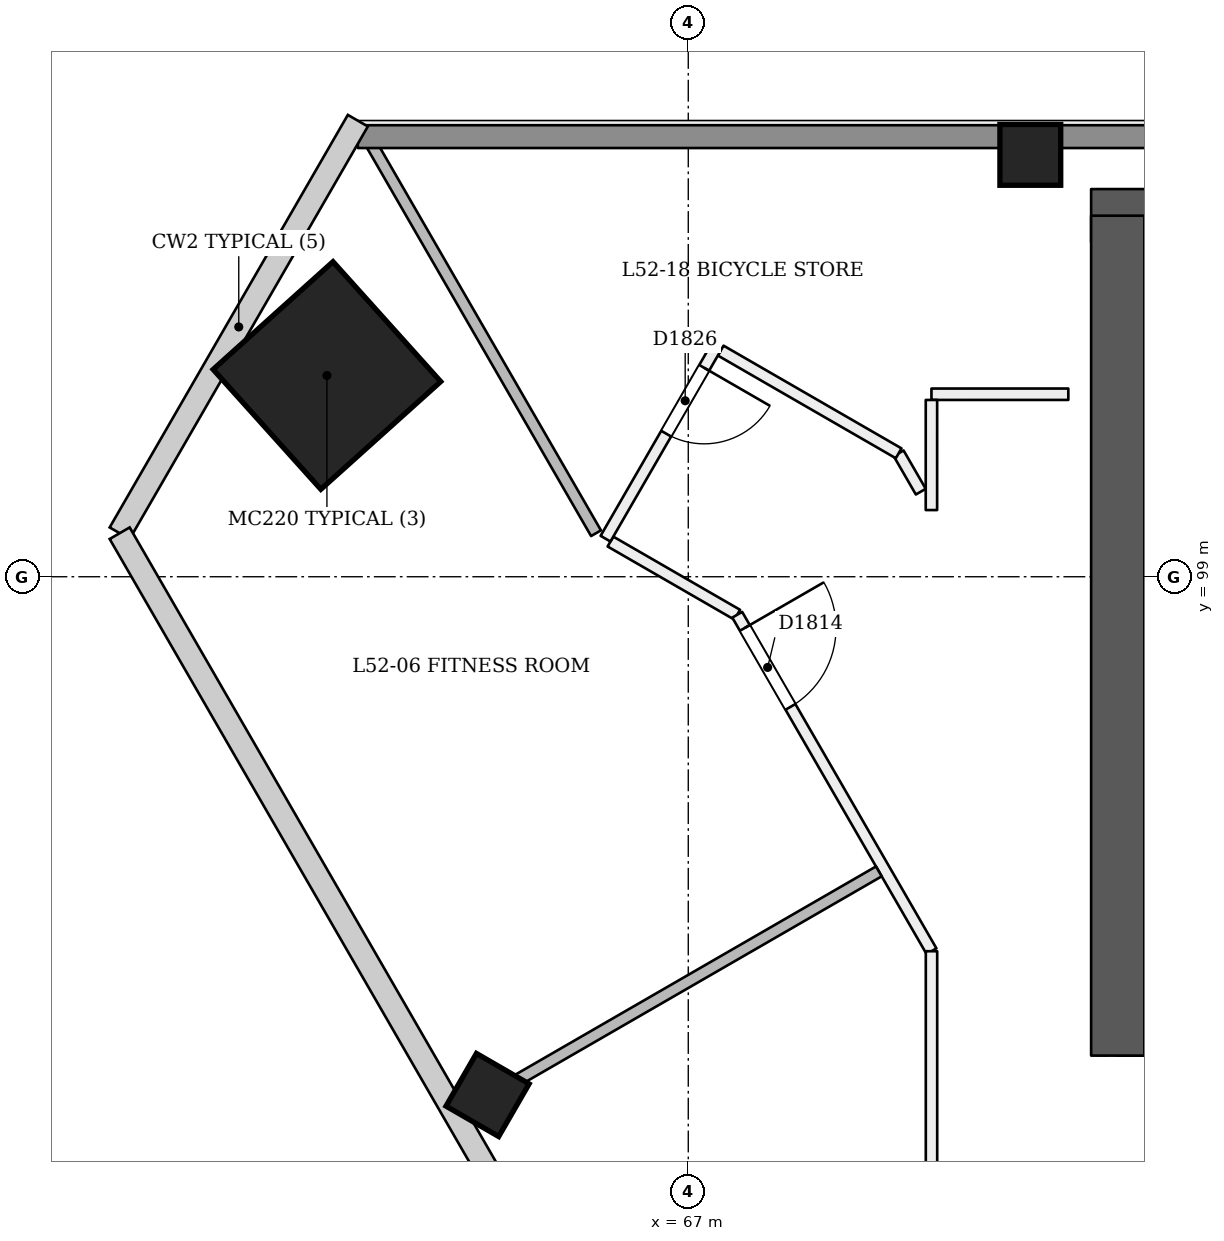
"""IFC4 building model, lengths in metres.
Left out: names, types, materials, properties, quantities, classifications, styles, units other than length and angle.
Written with IfcOpenShell. Run it as: python <this file> out.ifc"""

import sys

from ifc_helpers import new_model, si_unit, direction, frame, frame_2d, origin, origin_2d, place, context, subcontext, project, spatial, rectangle, extrude, element, fill, save


model = new_model("IFC4")
c1 = context("Model", 3, precision=1e-05, world=origin(), true_north=direction((0.0, 1.0)))
c2 = subcontext(c1, "Body", "Model", "MODEL_VIEW")
j1 = project(units=[si_unit("LENGTHUNIT", "METRE"), si_unit("PLANEANGLEUNIT", "RADIAN")], contexts=[c1])
p1 = place(None, origin())
s1 = spatial("IfcSite", under=j1, at=p1, CompositionType="ELEMENT")
p2 = place(p1, origin())
s2 = spatial("IfcBuilding", under=s1, at=p2, CompositionType="ELEMENT")
p3 = place(p2, frame((0.0, 0.0, 201.6)))
s3 = spatial("IfcBuildingStorey", under=s2, at=p3, CompositionType="ELEMENT", Elevation=201.6)
p4 = place(p3, frame((72.65, 93.05, 0.0), z_axis=(0.0, 0.0, 1.0), x_axis=(1.0, 0.0, 0.0)))
e1 = element("IfcWall", 1, at=p4, inside=s3, PredefinedType="SHEAR", context=c2, shape_type="SweptSolid", body=[
    extrude(rectangle(XDim=25.05, YDim=0.7, at=frame_2d((12.525, 0.0))), origin(), (0.0, 0.0, 1.0), 3.6),
])
p5 = place(p4, frame((1.15, 0.0, 0.0)))
e2 = element("IfcOpeningElement", 2, at=p5, cuts=e1, PredefinedType="OPENING", context=c2, shape_type="SweptSolid", body=[
    extrude(rectangle(XDim=1.2, YDim=2.1, at=frame_2d((0.6, 1.05))), frame((0.0, 0.36, 0.0), z_axis=(0.0, -1.0, 0.0), x_axis=(1.0, 0.0, 0.0)), (0.0, 0.0, 1.0), 0.721),
])
p6 = place(p4, frame((3.35, 0.0, 0.0)))
e3 = element("IfcOpeningElement", 3, at=p6, cuts=e1, PredefinedType="OPENING", context=c2, shape_type="SweptSolid", body=[
    extrude(rectangle(XDim=1.2, YDim=2.1, at=frame_2d((0.6, 1.05))), frame((0.0, 0.36, 0.0), z_axis=(0.0, -1.0, 0.0), x_axis=(1.0, 0.0, 0.0)), (0.0, 0.0, 1.0), 0.721),
])
p7 = place(p4, frame((13.35, 0.0, 0.0)))
e4 = element("IfcOpeningElement", 4, at=p7, cuts=e1, PredefinedType="OPENING", context=c2, shape_type="SweptSolid", body=[
    extrude(rectangle(XDim=1.2, YDim=2.1, at=frame_2d((0.6, 1.05))), frame((0.0, 0.36, 0.0), z_axis=(0.0, -1.0, 0.0), x_axis=(1.0, 0.0, 0.0)), (0.0, 0.0, 1.0), 0.721),
])
p8 = place(p4, frame((15.812, 0.0, 0.0)))
e5 = element("IfcOpeningElement", 5, at=p8, cuts=e1, PredefinedType="OPENING", context=c2, shape_type="SweptSolid", body=[
    extrude(rectangle(XDim=1.0, YDim=2.1, at=frame_2d((0.5, 1.05))), frame((0.0, 0.36, 0.0), z_axis=(0.0, -1.0, 0.0), x_axis=(1.0, 0.0, 0.0)), (0.0, 0.0, 1.0), 0.721),
])
p9 = place(p4, frame((18.25, 0.0, 0.0)))
e6 = element("IfcOpeningElement", 6, at=p9, cuts=e1, PredefinedType="OPENING", context=c2, shape_type="SweptSolid", body=[
    extrude(rectangle(XDim=1.0, YDim=2.1, at=frame_2d((0.5, 1.05))), frame((0.0, 0.36, 0.0), z_axis=(0.0, -1.0, 0.0), x_axis=(1.0, 0.0, 0.0)), (0.0, 0.0, 1.0), 0.721),
])
p10 = place(p4, frame((20.6, 0.0, 0.0)))
e7 = element("IfcOpeningElement", 7, at=p10, cuts=e1, PredefinedType="OPENING", context=c2, shape_type="SweptSolid", body=[
    extrude(rectangle(XDim=1.0, YDim=2.1, at=frame_2d((0.5, 1.05))), frame((0.0, 0.36, 0.0), z_axis=(0.0, -1.0, 0.0), x_axis=(1.0, 0.0, 0.0)), (0.0, 0.0, 1.0), 0.721),
])
p11 = place(p4, frame((22.887, 0.0, 0.0)))
e8 = element("IfcOpeningElement", 8, at=p11, cuts=e1, PredefinedType="OPENING", context=c2, shape_type="SweptSolid", body=[
    extrude(rectangle(XDim=1.0, YDim=2.1, at=frame_2d((0.5, 1.05))), frame((0.0, 0.36, 0.0), z_axis=(0.0, -1.0, 0.0), x_axis=(1.0, 0.0, 0.0)), (0.0, 0.0, 1.0), 0.721),
])
p12 = place(p3, frame((97.35, 103.75, 0.0), z_axis=(0.0, 0.0, 1.0), x_axis=(-1.0, 0.0, 0.0)))
e9 = element("IfcWall", 9, at=p12, inside=s3, PredefinedType="SHEAR", context=c2, shape_type="SweptSolid", body=[
    extrude(rectangle(XDim=25.05, YDim=0.7, at=frame_2d((12.525, 0.0))), origin(), (0.0, 0.0, 1.0), 3.6),
])
p13 = place(p3, frame((72.65, 103.75, 0.0), z_axis=(0.0, 0.0, 1.0), x_axis=(0.0, -1.0, 0.0)))
e10 = element("IfcWall", 10, at=p13, inside=s3, PredefinedType="SHEAR", context=c2, shape_type="SweptSolid", body=[
    extrude(rectangle(XDim=11.05, YDim=0.7, at=frame_2d((5.525, 0.0))), origin(), (0.0, 0.0, 1.0), 3.6),
])
p14 = place(p3, frame((62.212, 101.636, 0.0), z_axis=(0.028403721265, 0.009287135593, 0.999553389135), x_axis=(-0.866197445503, 0.499302495794, 0.019975061902)))
e11 = element("IfcColumn", 11, at=p14, inside=s3, PredefinedType="COLUMN", context=c2, shape_type="SweptSolid", body=[
    extrude(rectangle(XDim=2.12, YDim=2.12, at=origin_2d()), origin(), (0.0, 0.0, 1.0), 3.602),
])
p15 = place(p3, frame((71.5, 104.55, 0.0), z_axis=(0.0, 0.0, 1.0), x_axis=(1.0, 0.0, 0.0)))
e12 = element("IfcColumn", 12, at=p15, inside=s3, PredefinedType="COLUMN", context=c2, shape_type="SweptSolid", body=[
    extrude(rectangle(XDim=0.8, YDim=0.8, at=origin_2d()), origin(), (0.0, 0.0, 1.0), 3.6),
])
p16 = place(p3, frame((64.332, 92.135, -0.024), z_axis=(0.022221406801, 0.038413224561, 0.999014831351), x_axis=(-0.866024074112, -0.498523102043, 0.038432015134)))
e13 = element("IfcColumn", 13, at=p16, inside=s3, PredefinedType="COLUMN", context=c2, shape_type="SweptSolid", body=[
    extrude(rectangle(XDim=0.8, YDim=0.8, at=origin_2d()), origin(), (0.0, 0.0, 1.0), 3.604),
])
p17 = place(p3, frame((65.976, 99.463, 0.0), z_axis=(0.0, 0.0, 1.0), x_axis=(0.86605048973, -0.49995654735, 0.0)))
e14 = element("IfcWall", 14, at=p17, inside=s3, PredefinedType="PARTITIONING", context=c2, shape_type="SweptSolid", body=[
    extrude(rectangle(XDim=1.926, YDim=0.15, at=frame_2d((0.963, 0.0))), origin(), (0.0, 0.0, 1.0), 3.15),
])
p18 = place(p3, frame((67.644, 98.5, 0.0), z_axis=(0.0, 0.0, 1.0), x_axis=(0.499981548585, -0.866036056452, 0.0)))
e15 = element("IfcWall", 15, at=p18, inside=s3, PredefinedType="PARTITIONING", context=c2, shape_type="SweptSolid", body=[
    extrude(rectangle(XDim=5.112, YDim=0.15, at=frame_2d((2.556, 0.0))), origin(), (0.0, 0.0, 1.0), 3.15),
])
p19 = place(p18, frame((0.2, 0.0, 0.0)))
e16 = element("IfcOpeningElement", 16, at=p19, cuts=e15, PredefinedType="OPENING", context=c2, shape_type="SweptSolid", body=[
    extrude(rectangle(XDim=1.2, YDim=2.1, at=frame_2d((0.6, 1.05))), frame((0.0, 0.085, 0.0), z_axis=(0.0, -1.0, 0.0), x_axis=(1.0, 0.0, 0.0)), (0.0, 0.0, 1.0), 0.171),
])
p20 = place(p3, frame((70.2, 94.073, 0.0), z_axis=(0.0, 0.0, 1.0), x_axis=(6.3039778e-05, -0.999999998013, 0.0)))
e17 = element("IfcWall", 17, at=p20, inside=s3, PredefinedType="PARTITIONING", context=c2, shape_type="SweptSolid", body=[
    extrude(rectangle(XDim=3.873, YDim=0.15, at=frame_2d((1.937, 0.0))), origin(), (0.0, 0.0, 1.0), 3.15),
])
p21 = place(p3, frame((72.0, 101.401, 0.0), z_axis=(0.0, 0.0, 1.0), x_axis=(-1.0, 0.0, 0.0)))
e18 = element("IfcWall", 18, at=p21, inside=s3, PredefinedType="PARTITIONING", context=c2, shape_type="SweptSolid", body=[
    extrude(rectangle(XDim=1.801, YDim=0.15, at=frame_2d((0.9, 0.0))), origin(), (0.0, 0.0, 1.0), 3.15),
])
p22 = place(p3, frame((70.199, 101.326, 0.0), z_axis=(0.0, 0.0, 1.0), x_axis=(-0.000337040763, -0.999999943202, 0.0)))
e19 = element("IfcWall", 19, at=p22, inside=s3, PredefinedType="PARTITIONING", context=c2, shape_type="SweptSolid", body=[
    extrude(rectangle(XDim=1.449, YDim=0.15, at=frame_2d((0.724, 0.0))), origin(), (0.0, 0.0, 1.0), 3.15),
])
p23 = place(p3, frame((70.059, 100.119, 0.0), z_axis=(0.0, 0.0, 1.0), x_axis=(-0.500061095026, 0.865990127681, 0.0)))
e20 = element("IfcWall", 20, at=p23, inside=s3, PredefinedType="PARTITIONING", context=c2, shape_type="SweptSolid", body=[
    extrude(rectangle(XDim=0.583, YDim=0.15, at=frame_2d((0.291, 0.0))), origin(), (0.0, 0.0, 1.0), 3.15),
])
p24 = place(p3, frame((69.768, 100.624, 0.0), z_axis=(0.0, 0.0, 1.0), x_axis=(-0.866089324335, 0.499889270012, 0.0)))
e21 = element("IfcWall", 21, at=p24, inside=s3, PredefinedType="PARTITIONING", context=c2, shape_type="SweptSolid", body=[
    extrude(rectangle(XDim=2.703, YDim=0.15, at=frame_2d((1.351, 0.0))), origin(), (0.0, 0.0, 1.0), 3.15),
])
p25 = place(p3, frame((67.362, 102.012, 0.0), z_axis=(0.0, 0.0, 1.0), x_axis=(-0.500103712827, -0.865965516875, 0.0)))
e22 = element("IfcWall", 22, at=p25, inside=s3, PredefinedType="PARTITIONING", context=c2, shape_type="SweptSolid", body=[
    extrude(rectangle(XDim=2.901, YDim=0.15, at=frame_2d((1.45, 0.0))), origin(), (0.0, 0.0, 1.0), 3.15),
])
p26 = place(p25, frame((0.305, 0.0, 0.0)))
e23 = element("IfcOpeningElement", 23, at=p26, cuts=e22, PredefinedType="OPENING", context=c2, shape_type="SweptSolid", body=[
    extrude(rectangle(XDim=1.0, YDim=2.1, at=frame_2d((0.5, 1.05))), frame((0.0, 0.085, 0.0), z_axis=(0.0, -1.0, 0.0), x_axis=(1.0, 0.0, 0.0)), (0.0, 0.0, 1.0), 0.171),
])
p27 = place(p3, frame((64.03, 91.961, 0.0), z_axis=(0.0, 0.0, 1.0), x_axis=(0.866032601554, 0.49998753289, 0.0)))
e24 = element("IfcWall", 24, at=p27, inside=s3, PredefinedType="PARTITIONING", context=c2, shape_type="SweptSolid", body=[
    extrude(rectangle(XDim=6.325, YDim=0.15, at=frame_2d((3.163, 0.0))), origin(), (0.0, 0.0, 1.0), 2.65),
])
p28 = place(p3, frame((65.786, 99.573, 0.0), z_axis=(0.0, 0.0, 1.0), x_axis=(-0.500006463187, 0.866021672229, 0.0)))
e25 = element("IfcWall", 25, at=p28, inside=s3, PredefinedType="PARTITIONING", context=c2, shape_type="SweptSolid", body=[
    extrude(rectangle(XDim=6.151, YDim=0.15, at=frame_2d((3.076, 0.0))), origin(), (0.0, 0.0, 1.0), 2.65),
])
p29 = place(p3, frame((62.653, 104.79, 0.0), z_axis=(0.0, 0.0, 1.0), x_axis=(1.0, 0.0, 0.0)))
e26 = element("IfcWall", 26, at=p29, inside=s3, PredefinedType="SOLIDWALL", context=c2, shape_type="SweptSolid", body=[
    extrude(rectangle(XDim=44.694, YDim=0.3, at=frame_2d((22.347, 0.0))), origin(), (0.0, 0.0, 1.0), 2.65),
])
p30 = place(p19, origin())
e27 = element("IfcDoor", 27, at=p30, inside=s3, OperationType="SINGLE_SWING_LEFT", PredefinedType="NOTDEFINED", context=c2, shape_type="SweptSolid", body=[
    extrude(rectangle(XDim=1.2, YDim=2.1, at=frame_2d((0.6, 1.05))), frame((0.0, 0.025, 0.0), z_axis=(0.0, -1.0, 0.0), x_axis=(1.0, 0.0, 0.0)), (0.0, 0.0, 1.0), 0.05),
])
fill(e16, e27)
p31 = place(p26, origin())
e28 = element("IfcDoor", 28, at=p31, inside=s3, OperationType="SINGLE_SWING_LEFT", PredefinedType="NOTDEFINED", context=c2, shape_type="SweptSolid", body=[
    extrude(rectangle(XDim=1.0, YDim=2.1, at=frame_2d((0.5, 1.05))), frame((0.0, 0.025, 0.0), z_axis=(0.0, -1.0, 0.0), x_axis=(1.0, 0.0, 0.0)), (0.0, 0.0, 1.0), 0.05),
])
fill(e23, e28)
save(model, sys.argv[1])
